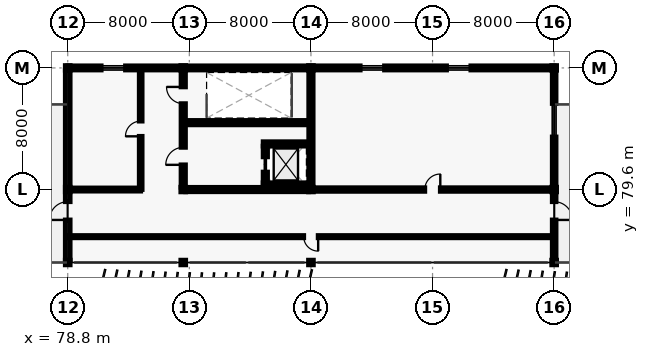
"""IFC4 building model, lengths in metres.
Left out: names, types, materials, properties, quantities, classifications, styles, units other than length and angle.
Written with IfcOpenShell. Run it as: python <this file> out.ifc"""

import sys

from ifc_helpers import new_model, si_unit, direction, frame, frame_2d, origin, origin_2d, place, context, subcontext, project, spatial, rectangle, i_section, extrude, element, fill, save


model = new_model("IFC4")
c1 = context("Model", 3, precision=1e-05, world=origin(), true_north=direction((0.0, 1.0)))
c2 = subcontext(c1, "Body", "Model", "MODEL_VIEW")
j1 = project(units=[si_unit("LENGTHUNIT", "METRE"), si_unit("PLANEANGLEUNIT", "RADIAN")], contexts=[c1])
p1 = place(None, origin())
s1 = spatial("IfcSite", under=j1, at=p1, CompositionType="ELEMENT")
p2 = place(p1, origin())
s2 = spatial("IfcBuilding", under=s1, at=p2, CompositionType="ELEMENT")
p3 = place(p2, frame((0.0, 0.0, 20.4)))
s3 = spatial("IfcBuildingStorey", under=s2, at=p3, CompositionType="ELEMENT", Elevation=20.4)
for number, where, z_axis, x_axis in (
    (1, (78.8, 74.8, 0.0), (0.0, 0.0, 1.0), (1.0, 0.0, 0.0)),
    (2, (78.8, 79.6, 0.0), (0.0, 0.0, 1.0), (1.0, 0.0, 0.0)),
    (3, (78.8, 87.6, 0.0), (0.0, 0.0, 1.0), (1.0, 0.0, 0.0)),
    (4, (86.4, 74.8, 0.0), (0.0, 0.0, 1.0), (1.0, 0.0, 0.0)),
    (5, (86.4, 79.6, 0.0), (0.0, 0.0, 1.0), (1.0, 0.0, 0.0)),
    (6, (86.4, 87.6, 0.0), (0.0, 0.0, 1.0), (1.0, 0.0, 0.0)),
    (7, (94.8, 74.8, 0.0), (0.0, 0.0, 1.0), (1.0, 0.0, 0.0)),
    (8, (94.8, 79.6, 0.0), (0.0, 0.0, 1.0), (1.0, 0.0, 0.0)),
    (9, (94.8, 87.6, 0.0), (0.0, 0.0, 1.0), (1.0, 0.0, 0.0)),
    (10, (110.8, 74.8, 0.0), (0.0, 0.0, 1.0), (1.0, 0.0, 0.0)),
    (11, (110.8, 79.6, 0.0), (0.0, 0.0, 1.0), (1.0, 0.0, 0.0)),
    (12, (110.8, 87.6, 0.0), (0.0, 0.0, 1.0), (1.0, 0.0, 0.0)),
):
    element("IfcColumn", number, at=place(p3, frame(where, z_axis=z_axis, x_axis=x_axis)), inside=s3, PredefinedType="COLUMN", context=c2, shape_type="SweptSolid", body=[
        extrude(i_section(OverallWidth=0.309, OverallDepth=0.321, WebThickness=0.014, FlangeThickness=0.022, at=origin_2d()), origin(), (0.0, 0.0, 1.0), 4.5),
    ])
p4 = place(p3, frame((78.8, 87.6, 0.0), z_axis=(0.0, 0.0, 1.0), x_axis=(1.0, 0.0, 0.0)))
e13 = element("IfcWall", 13, at=p4, inside=s3, PredefinedType="SOLIDWALL", context=c2, shape_type="SweptSolid", body=[
    extrude(rectangle(XDim=32.0, YDim=0.275, at=frame_2d((16.0, 0.0))), origin(), (0.0, 0.0, 1.0), 3.62),
])
p5 = place(p4, frame((2.2, 0.0, 0.9)))
e14 = element("IfcOpeningElement", 14, at=p5, cuts=e13, PredefinedType="OPENING", context=c2, shape_type="SweptSolid", body=[
    extrude(rectangle(XDim=1.6, YDim=1.65, at=frame_2d((0.8, 0.825))), frame((0.0, 0.147, 0.0), z_axis=(0.0, -1.0, 0.0), x_axis=(1.0, 0.0, 0.0)), (0.0, 0.0, 1.0), 0.295),
])
p6 = place(p4, frame((19.24, 0.0, 0.9)))
e15 = element("IfcOpeningElement", 15, at=p6, cuts=e13, PredefinedType="OPENING", context=c2, shape_type="SweptSolid", body=[
    extrude(rectangle(XDim=1.6, YDim=1.65, at=frame_2d((0.8, 0.825))), frame((0.0, 0.147, 0.0), z_axis=(0.0, -1.0, 0.0), x_axis=(1.0, 0.0, 0.0)), (0.0, 0.0, 1.0), 0.295),
])
p7 = place(p4, frame((24.92, 0.0, 0.9)))
e16 = element("IfcOpeningElement", 16, at=p7, cuts=e13, PredefinedType="OPENING", context=c2, shape_type="SweptSolid", body=[
    extrude(rectangle(XDim=1.6, YDim=1.65, at=frame_2d((0.8, 0.825))), frame((0.0, 0.147, 0.0), z_axis=(0.0, -1.0, 0.0), x_axis=(1.0, 0.0, 0.0)), (0.0, 0.0, 1.0), 0.295),
])
p8 = place(p3, frame((110.8, 87.46, 0.0), z_axis=(0.0, 0.0, 1.0), x_axis=(0.0, -1.0, 0.0)))
e17 = element("IfcWall", 17, at=p8, inside=s3, PredefinedType="SOLIDWALL", context=c2, shape_type="SweptSolid", body=[
    extrude(rectangle(XDim=12.52, YDim=0.25, at=frame_2d((6.26, 0.0))), origin(), (0.0, 0.0, 1.0), 3.773),
])
p9 = place(p8, frame((8.66, 0.0, 0.0)))
e18 = element("IfcOpeningElement", 18, at=p9, cuts=e17, PredefinedType="OPENING", context=c2, shape_type="SweptSolid", body=[
    extrude(rectangle(XDim=1.2, YDim=2.2, at=frame_2d((0.6, 1.1))), frame((0.0, 0.135, 0.0), z_axis=(0.0, -1.0, 0.0), x_axis=(1.0, 0.0, 0.0)), (0.0, 0.0, 1.0), 0.27),
])
p10 = place(p8, frame((2.2, 0.0, 0.8)))
e19 = element("IfcOpeningElement", 19, at=p10, cuts=e17, PredefinedType="OPENING", context=c2, shape_type="SweptSolid", body=[
    extrude(rectangle(XDim=2.2, YDim=2.25, at=frame_2d((1.1, 1.125))), frame((0.0, 0.135, 0.0), z_axis=(0.0, -1.0, 0.0), x_axis=(1.0, 0.0, 0.0)), (0.0, 0.0, 1.0), 0.27),
])
p11 = place(p3, frame((78.8, 74.94, 0.0), z_axis=(0.0, 0.0, 1.0), x_axis=(0.0, 1.0, 0.0)))
e20 = element("IfcWall", 20, at=p11, inside=s3, PredefinedType="SOLIDWALL", context=c2, shape_type="SweptSolid", body=[
    extrude(rectangle(XDim=12.52, YDim=0.32, at=frame_2d((6.26, 0.0))), origin(), (0.0, 0.0, 1.0), 3.773),
])
p12 = place(p11, frame((2.66, 0.0, 0.0)))
e21 = element("IfcOpeningElement", 21, at=p12, cuts=e20, PredefinedType="OPENING", context=c2, shape_type="SweptSolid", body=[
    extrude(rectangle(XDim=1.2, YDim=2.2, at=frame_2d((0.6, 1.1))), frame((0.0, 0.17, 0.0), z_axis=(0.0, -1.0, 0.0), x_axis=(1.0, 0.0, 0.0)), (0.0, 0.0, 1.0), 0.34),
])
p13 = place(p3, frame((86.557, 79.6, 0.0), z_axis=(0.0, 0.0, 1.0), x_axis=(1.0, 0.0, 0.0)))
e22 = element("IfcWall", 22, at=p13, inside=s3, PredefinedType="SHEAR", context=c2, shape_type="SweptSolid", body=[
    extrude(rectangle(XDim=8.086, YDim=0.29, at=frame_2d((4.043, 0.0))), origin(), (0.0, 0.0, 1.0), 4.255),
])
p14 = place(p3, frame((86.4, 79.745, 0.0), z_axis=(0.0, 0.0, 1.0), x_axis=(0.0, 1.0, 0.0)))
e23 = element("IfcWall", 23, at=p14, inside=s3, PredefinedType="SHEAR", context=c2, shape_type="SweptSolid", body=[
    extrude(rectangle(XDim=7.71, YDim=0.29, at=frame_2d((3.855, 0.0))), origin(), (0.0, 0.0, 1.0), 4.255),
])
p15 = place(p14, frame((5.505, 0.0, 0.0)))
e24 = element("IfcOpeningElement", 24, at=p15, cuts=e23, PredefinedType="OPENING", context=c2, shape_type="SweptSolid", body=[
    extrude(rectangle(XDim=1.1, YDim=2.15, at=frame_2d((0.55, 1.075))), frame((0.0, 0.155, 0.0), z_axis=(0.0, -1.0, 0.0), x_axis=(1.0, 0.0, 0.0)), (0.0, 0.0, 1.0), 0.31),
])
p16 = place(p14, frame((1.48, 0.0, 0.0)))
e25 = element("IfcOpeningElement", 25, at=p16, cuts=e23, PredefinedType="OPENING", context=c2, shape_type="SweptSolid", body=[
    extrude(rectangle(XDim=1.15, YDim=2.2, at=frame_2d((0.575, 1.1))), frame((0.0, 0.155, 0.0), z_axis=(0.0, -1.0, 0.0), x_axis=(1.0, 0.0, 0.0)), (0.0, 0.0, 1.0), 0.31),
])
p17 = place(p3, frame((94.8, 79.745, 0.0), z_axis=(0.0, 0.0, 1.0), x_axis=(0.0, 1.0, 0.0)))
e26 = element("IfcWall", 26, at=p17, inside=s3, PredefinedType="SHEAR", context=c2, shape_type="SweptSolid", body=[
    extrude(rectangle(XDim=7.71, YDim=0.29, at=frame_2d((3.855, 0.0))), origin(), (0.0, 0.0, 1.0), 4.255),
])
p18 = place(p3, frame((86.545, 84.0, 0.0), z_axis=(0.0, 0.0, 1.0), x_axis=(1.0, 0.0, 0.0)))
e27 = element("IfcWall", 27, at=p18, inside=s3, PredefinedType="SHEAR", context=c2, shape_type="SweptSolid", body=[
    extrude(rectangle(XDim=8.11, YDim=0.29, at=frame_2d((4.055, 0.0))), origin(), (0.0, 0.0, 1.0), 4.255),
])
for number, where, z_axis, x_axis in (
    (28, (91.655, 79.9, 0.0), (0.0, 0.0, 1.0), (1.0, 0.0, 0.0)),
    (29, (91.655, 82.6, 0.0), (0.0, 0.0, 1.0), (1.0, 0.0, 0.0)),
):
    element("IfcWall", number, at=place(p3, frame(where, z_axis=z_axis, x_axis=x_axis)), inside=s3, PredefinedType="SHEAR", context=c2, shape_type="SweptSolid", body=[
        extrude(rectangle(XDim=2.99, YDim=0.29, at=frame_2d((1.495, 0.0))), origin(), (0.0, 0.0, 1.0), 4.255),
    ])
p19 = place(p3, frame((91.8, 80.045, 0.0), z_axis=(0.0, 0.0, 1.0), x_axis=(0.0, 1.0, 0.0)))
e30 = element("IfcWall", 30, at=p19, inside=s3, PredefinedType="SHEAR", context=c2, shape_type="SweptSolid", body=[
    extrude(rectangle(XDim=2.41, YDim=0.29, at=frame_2d((1.205, 0.0))), origin(), (0.0, 0.0, 1.0), 4.255),
])
p20 = place(p19, frame((0.705, 0.0, 0.0)))
e31 = element("IfcOpeningElement", 31, at=p20, cuts=e30, PredefinedType="OPENING", context=c2, shape_type="SweptSolid", body=[
    extrude(rectangle(XDim=1.0, YDim=2.15, at=frame_2d((0.5, 1.075))), frame((0.0, 0.155, 0.0), z_axis=(0.0, -1.0, 0.0), x_axis=(1.0, 0.0, 0.0)), (0.0, 0.0, 1.0), 0.31),
])
p21 = place(p3, frame((110.8, 76.5, 0.0), z_axis=(0.0, 0.0, 1.0), x_axis=(-1.0, 0.0, 0.0)))
e32 = element("IfcWall", 32, at=p21, inside=s3, PredefinedType="PARTITIONING", context=c2, shape_type="SweptSolid", body=[
    extrude(rectangle(XDim=32.0, YDim=0.15, at=frame_2d((16.0, 0.0))), origin(), (0.0, 0.0, 1.0), 4.255),
])
p22 = place(p21, frame((15.525, 0.0, 0.0)))
e33 = element("IfcOpeningElement", 33, at=p22, cuts=e32, PredefinedType="OPENING", context=c2, shape_type="SweptSolid", body=[
    extrude(rectangle(XDim=0.95, YDim=2.1, at=frame_2d((0.475, 1.05))), frame((0.0, 0.085, 0.0), z_axis=(0.0, -1.0, 0.0), x_axis=(1.0, 0.0, 0.0)), (0.0, 0.0, 1.0), 0.17),
])
p23 = place(p3, frame((94.957, 79.6, 0.0), z_axis=(0.0, 0.0, 1.0), x_axis=(1.0, 0.0, 0.0)))
e34 = element("IfcWall", 34, at=p23, inside=s3, PredefinedType="PARTITIONING", context=c2, shape_type="SweptSolid", body=[
    extrude(rectangle(XDim=15.686, YDim=0.24, at=frame_2d((7.843, 0.0))), origin(), (0.0, 0.0, 1.0), 3.62),
])
p24 = place(p23, frame((7.333, 0.0, 0.0)))
e35 = element("IfcOpeningElement", 35, at=p24, cuts=e34, PredefinedType="OPENING", context=c2, shape_type="SweptSolid", body=[
    extrude(rectangle(XDim=1.02, YDim=2.1, at=frame_2d((0.51, 1.05))), frame((0.0, 0.13, 0.0), z_axis=(0.0, -1.0, 0.0), x_axis=(1.0, 0.0, 0.0)), (0.0, 0.0, 1.0), 0.26),
])
p25 = place(p3, frame((78.957, 79.6, 0.0), z_axis=(0.0, 0.0, 1.0), x_axis=(1.0, 0.0, 0.0)))
e36 = element("IfcWall", 36, at=p25, inside=s3, PredefinedType="PARTITIONING", context=c2, shape_type="SweptSolid", body=[
    extrude(rectangle(XDim=4.643, YDim=0.21, at=frame_2d((2.322, 0.0))), origin(), (0.0, 0.0, 1.0), 3.62),
])
p26 = place(p3, frame((83.6, 79.6, 0.0), z_axis=(0.0, 0.0, 1.0), x_axis=(0.0, 1.0, 0.0)))
e37 = element("IfcWall", 37, at=p26, inside=s3, PredefinedType="PARTITIONING", context=c2, shape_type="SweptSolid", body=[
    extrude(rectangle(XDim=8.0, YDim=0.19, at=frame_2d((4.0, 0.0))), origin(), (0.0, 0.0, 1.0), 4.255),
])
p27 = place(p26, frame((3.5, 0.0, 0.0)))
e38 = element("IfcOpeningElement", 38, at=p27, cuts=e37, PredefinedType="OPENING", context=c2, shape_type="SweptSolid", body=[
    extrude(rectangle(XDim=1.0, YDim=2.1, at=frame_2d((0.5, 1.05))), frame((0.0, 0.105, 0.0), z_axis=(0.0, -1.0, 0.0), x_axis=(1.0, 0.0, 0.0)), (0.0, 0.0, 1.0), 0.21),
])
p28 = place(p12, origin())
e39 = element("IfcDoor", 39, at=p28, inside=s3, OperationType="SINGLE_SWING_LEFT", PredefinedType="DOOR", context=c2, shape_type="SweptSolid", body=[
    extrude(rectangle(XDim=1.2, YDim=2.2, at=frame_2d((0.6, 1.1))), frame((0.0, 0.025, 0.0), z_axis=(0.0, -1.0, 0.0), x_axis=(1.0, 0.0, 0.0)), (0.0, 0.0, 1.0), 0.05),
])
fill(e21, e39)
p29 = place(p9, origin())
e40 = element("IfcDoor", 40, at=p29, inside=s3, OperationType="SINGLE_SWING_RIGHT", PredefinedType="DOOR", context=c2, shape_type="SweptSolid", body=[
    extrude(rectangle(XDim=1.2, YDim=2.2, at=frame_2d((0.6, 1.1))), frame((0.0, 0.025, 0.0), z_axis=(0.0, -1.0, 0.0), x_axis=(1.0, 0.0, 0.0)), (0.0, 0.0, 1.0), 0.05),
])
fill(e18, e40)
p30 = place(p5, origin())
e41 = element("IfcWindow", 41, at=p30, inside=s3, PartitioningType="SINGLE_PANEL", PredefinedType="WINDOW", context=c2, shape_type="SweptSolid", body=[
    extrude(rectangle(XDim=1.6, YDim=1.65, at=frame_2d((0.8, 0.825))), frame((0.0, 0.03, 0.0), z_axis=(0.0, -1.0, 0.0), x_axis=(1.0, 0.0, 0.0)), (0.0, 0.0, 1.0), 0.06),
])
fill(e14, e41)
p31 = place(p6, origin())
e42 = element("IfcWindow", 42, at=p31, inside=s3, PartitioningType="SINGLE_PANEL", PredefinedType="WINDOW", context=c2, shape_type="SweptSolid", body=[
    extrude(rectangle(XDim=1.6, YDim=1.65, at=frame_2d((0.8, 0.825))), frame((0.0, 0.03, 0.0), z_axis=(0.0, -1.0, 0.0), x_axis=(1.0, 0.0, 0.0)), (0.0, 0.0, 1.0), 0.06),
])
fill(e15, e42)
p32 = place(p7, origin())
e43 = element("IfcWindow", 43, at=p32, inside=s3, PartitioningType="SINGLE_PANEL", PredefinedType="WINDOW", context=c2, shape_type="SweptSolid", body=[
    extrude(rectangle(XDim=1.6, YDim=1.65, at=frame_2d((0.8, 0.825))), frame((0.0, 0.03, 0.0), z_axis=(0.0, -1.0, 0.0), x_axis=(1.0, 0.0, 0.0)), (0.0, 0.0, 1.0), 0.06),
])
fill(e16, e43)
p33 = place(p10, origin())
e44 = element("IfcWindow", 44, at=p33, inside=s3, PartitioningType="SINGLE_PANEL", PredefinedType="WINDOW", context=c2, shape_type="SweptSolid", body=[
    extrude(rectangle(XDim=2.2, YDim=2.25, at=frame_2d((1.1, 1.125))), frame((0.0, 0.03, 0.0), z_axis=(0.0, -1.0, 0.0), x_axis=(1.0, 0.0, 0.0)), (0.0, 0.0, 1.0), 0.06),
])
fill(e19, e44)
p34 = place(p15, origin())
e45 = element("IfcDoor", 45, at=p34, inside=s3, OperationType="SINGLE_SWING_RIGHT", PredefinedType="DOOR", context=c2, shape_type="SweptSolid", body=[
    extrude(rectangle(XDim=1.1, YDim=2.15, at=frame_2d((0.55, 1.075))), frame((0.0, 0.025, 0.0), z_axis=(0.0, -1.0, 0.0), x_axis=(1.0, 0.0, 0.0)), (0.0, 0.0, 1.0), 0.05),
])
fill(e24, e45)
p35 = place(p16, origin())
e46 = element("IfcDoor", 46, at=p35, inside=s3, OperationType="SINGLE_SWING_LEFT", PredefinedType="DOOR", context=c2, shape_type="SweptSolid", body=[
    extrude(rectangle(XDim=1.15, YDim=2.2, at=frame_2d((0.575, 1.1))), frame((0.0, 0.025, 0.0), z_axis=(0.0, -1.0, 0.0), x_axis=(1.0, 0.0, 0.0)), (0.0, 0.0, 1.0), 0.05),
])
fill(e25, e46)
p36 = place(p20, origin())
e47 = element("IfcDoor", 47, at=p36, inside=s3, OperationType="SLIDING_TO_LEFT", PredefinedType="DOOR", context=c2, shape_type="SweptSolid", body=[
    extrude(rectangle(XDim=1.0, YDim=2.15, at=frame_2d((0.5, 1.075))), frame((0.0, 0.025, 0.0), z_axis=(0.0, -1.0, 0.0), x_axis=(1.0, 0.0, 0.0)), (0.0, 0.0, 1.0), 0.05),
])
fill(e31, e47)
p37 = place(p22, origin())
e48 = element("IfcDoor", 48, at=p37, inside=s3, OperationType="SINGLE_SWING_LEFT", PredefinedType="DOOR", context=c2, shape_type="SweptSolid", body=[
    extrude(rectangle(XDim=0.95, YDim=2.1, at=frame_2d((0.475, 1.05))), frame((0.0, 0.025, 0.0), z_axis=(0.0, -1.0, 0.0), x_axis=(1.0, 0.0, 0.0)), (0.0, 0.0, 1.0), 0.05),
])
fill(e33, e48)
p38 = place(p24, origin())
e49 = element("IfcDoor", 49, at=p38, inside=s3, OperationType="SINGLE_SWING_RIGHT", PredefinedType="DOOR", context=c2, shape_type="SweptSolid", body=[
    extrude(rectangle(XDim=1.02, YDim=2.1, at=frame_2d((0.51, 1.05))), frame((0.0, 0.025, 0.0), z_axis=(0.0, -1.0, 0.0), x_axis=(1.0, 0.0, 0.0)), (0.0, 0.0, 1.0), 0.05),
])
fill(e35, e49)
p39 = place(p27, origin())
e50 = element("IfcDoor", 50, at=p39, inside=s3, OperationType="SINGLE_SWING_LEFT", PredefinedType="DOOR", context=c2, shape_type="SweptSolid", body=[
    extrude(rectangle(XDim=1.0, YDim=2.1, at=frame_2d((0.5, 1.05))), frame((0.0, 0.025, 0.0), z_axis=(0.0, -1.0, 0.0), x_axis=(1.0, 0.0, 0.0)), (0.0, 0.0, 1.0), 0.05),
])
fill(e38, e50)
save(model, sys.argv[1])
